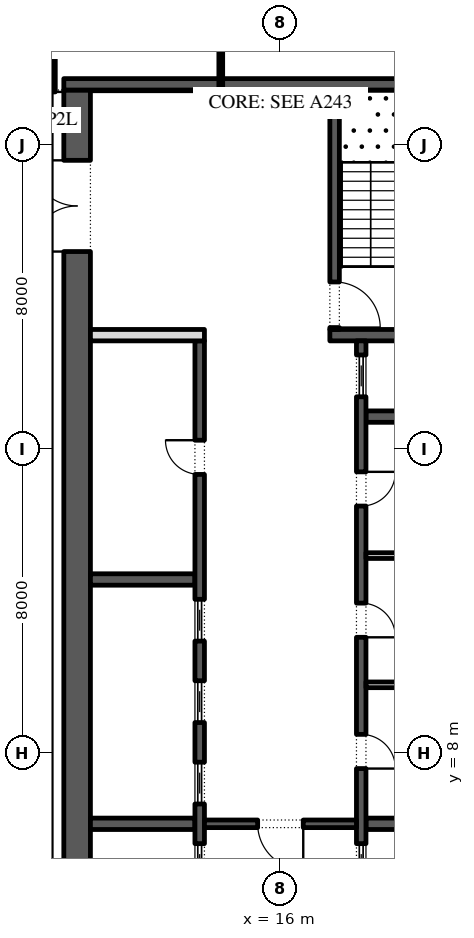
"""IFC4 building model, lengths in metres.
Left out: names, types, materials, properties, quantities, classifications, styles, units other than length and angle.
Written with IfcOpenShell. Run it as: python <this file> out.ifc"""

import sys

from ifc_helpers import new_model, si_unit, direction, frame, frame_2d, origin, place, context, subcontext, project, spatial, rectangle, extrude, element, fill, save


model = new_model("IFC4")
c1 = context("Model", 3, precision=1e-05, world=origin(), true_north=direction((0.0, 1.0)))
c2 = subcontext(c1, "Body", "Model", "MODEL_VIEW")
j1 = project(units=[si_unit("LENGTHUNIT", "METRE"), si_unit("PLANEANGLEUNIT", "RADIAN")], contexts=[c1])
p1 = place(None, origin())
s1 = spatial("IfcSite", under=j1, at=p1, CompositionType="ELEMENT")
p2 = place(p1, origin())
s2 = spatial("IfcBuilding", under=s1, at=p2, CompositionType="ELEMENT")
p3 = place(p2, frame((0.0, 0.0, 184.2)))
s3 = spatial("IfcBuildingStorey", under=s2, at=p3, CompositionType="ELEMENT", Elevation=184.2)
p4 = place(p3, frame((10.65, -2.45, 0.0), z_axis=(0.0, 0.0, 1.0), x_axis=(0.0, 1.0, 0.0)))
e1 = element("IfcWall", 1, at=p4, inside=s3, PredefinedType="SHEAR", context=c2, shape_type="SweptSolid", body=[
    extrude(rectangle(XDim=27.9, YDim=0.7, at=frame_2d((13.95, 0.0))), origin(), (0.0, 0.0, 1.0), 4.0),
])
p5 = place(p4, frame((23.65, 0.0, 0.0)))
e2 = element("IfcOpeningElement", 2, at=p5, cuts=e1, PredefinedType="OPENING", context=c2, shape_type="SweptSolid", body=[
    extrude(rectangle(XDim=2.4, YDim=2.1, at=frame_2d((1.2, 1.05))), frame((0.0, 0.36, 0.0), z_axis=(0.0, -1.0, 0.0), x_axis=(1.0, 0.0, 0.0)), (0.0, 0.0, 1.0), 0.72),
])
p6 = place(p4, frame((1.387, 0.0, 0.0)))
e3 = element("IfcOpeningElement", 3, at=p6, cuts=e1, PredefinedType="OPENING", context=c2, shape_type="SweptSolid", body=[
    extrude(rectangle(XDim=0.9, YDim=2.1, at=frame_2d((0.45, 1.05))), frame((0.0, 0.36, 0.0), z_axis=(0.0, -1.0, 0.0), x_axis=(1.0, 0.0, 0.0)), (0.0, 0.0, 1.0), 0.72),
])
p7 = place(p4, frame((4.562, 0.0, 0.0)))
e4 = element("IfcOpeningElement", 4, at=p7, cuts=e1, PredefinedType="OPENING", context=c2, shape_type="SweptSolid", body=[
    extrude(rectangle(XDim=1.0, YDim=2.1, at=frame_2d((0.5, 1.05))), frame((0.0, 0.36, 0.0), z_axis=(0.0, -1.0, 0.0), x_axis=(1.0, 0.0, 0.0)), (0.0, 0.0, 1.0), 0.72),
])
p8 = place(p3, frame((10.3, 25.6, 0.0), z_axis=(0.0, 0.0, 1.0), x_axis=(1.0, 0.0, 0.0)))
e5 = element("IfcWall", 5, at=p8, inside=s3, PredefinedType="SHEAR", context=c2, shape_type="SweptSolid", body=[
    extrude(rectangle(XDim=11.4, YDim=0.3, at=frame_2d((5.7, 0.0))), origin(), (0.0, 0.0, 1.0), 4.0),
])
p9 = place(p3, frame((17.3, 19.0, 0.0), z_axis=(0.0, 0.0, 1.0), x_axis=(1.0, 0.0, 0.0)))
e6 = element("IfcWall", 6, at=p9, inside=s3, PredefinedType="SHEAR", context=c2, shape_type="SweptSolid", body=[
    extrude(rectangle(XDim=3.7, YDim=0.3, at=frame_2d((1.85, 0.0))), origin(), (0.0, 0.0, 1.0), 4.0),
])
p10 = place(p3, frame((17.425, 19.15, 0.0), z_axis=(0.0, 0.0, 1.0), x_axis=(0.0, 1.0, 0.0)))
e7 = element("IfcWall", 7, at=p10, inside=s3, PredefinedType="SHEAR", context=c2, shape_type="SweptSolid", body=[
    extrude(rectangle(XDim=6.3, YDim=0.25, at=frame_2d((3.15, 0.0))), origin(), (0.0, 0.0, 1.0), 4.0),
])
p11 = place(p10, frame((0.05, 0.0, 0.0)))
e8 = element("IfcOpeningElement", 8, at=p11, cuts=e7, PredefinedType="OPENING", context=c2, shape_type="SweptSolid", body=[
    extrude(rectangle(XDim=1.2, YDim=2.1, at=frame_2d((0.6, 1.05))), frame((0.0, 0.135, 0.0), z_axis=(0.0, -1.0, 0.0), x_axis=(1.0, 0.0, 0.0)), (0.0, 0.0, 1.0), 0.27),
])
for number, where, z_axis, x_axis in (
    (9, (18.25, 6.143, 0.0), (0.0, 0.0, 1.0), (1.0, 0.0, 0.0)),
    (10, (18.25, 16.857, 0.0), (0.0, 0.0, 1.0), (1.0, 0.0, 0.0)),
):
    element("IfcWall", number, at=place(p3, frame(where, z_axis=z_axis, x_axis=x_axis)), inside=s3, PredefinedType="SHEAR", context=c2, shape_type="SweptSolid", body=[
        extrude(rectangle(XDim=2.75, YDim=0.3, at=frame_2d((1.375, 0.0))), origin(), (0.0, 0.0, 1.0), 4.0),
    ])
p12 = place(p3, frame((18.125, 4.15, 0.0), z_axis=(0.0, 0.0, 1.0), x_axis=(0.0, 1.0, 0.0)))
e11 = element("IfcWall", 11, at=p12, inside=s3, PredefinedType="SHEAR", context=c2, shape_type="SweptSolid", body=[
    extrude(rectangle(XDim=14.7, YDim=0.25, at=frame_2d((7.35, 0.0))), origin(), (0.0, 0.0, 1.0), 4.0),
])
p13 = place(p12, frame((3.446, 0.0, 0.0)))
e12 = element("IfcOpeningElement", 12, at=p13, cuts=e11, PredefinedType="OPENING", context=c2, shape_type="SweptSolid", body=[
    extrude(rectangle(XDim=0.9, YDim=2.1, at=frame_2d((0.45, 1.05))), frame((0.0, 0.135, 0.0), z_axis=(0.0, -1.0, 0.0), x_axis=(1.0, 0.0, 0.0)), (0.0, 0.0, 1.0), 0.27),
])
p14 = place(p12, frame((6.9, 0.0, 0.0)))
e13 = element("IfcOpeningElement", 13, at=p14, cuts=e11, PredefinedType="OPENING", context=c2, shape_type="SweptSolid", body=[
    extrude(rectangle(XDim=0.9, YDim=2.1, at=frame_2d((0.45, 1.05))), frame((0.0, 0.135, 0.0), z_axis=(0.0, -1.0, 0.0), x_axis=(1.0, 0.0, 0.0)), (0.0, 0.0, 1.0), 0.27),
])
p15 = place(p12, frame((10.354, 0.0, 0.0)))
e14 = element("IfcOpeningElement", 14, at=p15, cuts=e11, PredefinedType="OPENING", context=c2, shape_type="SweptSolid", body=[
    extrude(rectangle(XDim=0.9, YDim=2.1, at=frame_2d((0.45, 1.05))), frame((0.0, 0.135, 0.0), z_axis=(0.0, -1.0, 0.0), x_axis=(1.0, 0.0, 0.0)), (0.0, 0.0, 1.0), 0.27),
])
p16 = place(p12, frame((0.371, 0.0, 0.0)))
e15 = element("IfcOpeningElement", 15, at=p16, cuts=e11, PredefinedType="OPENING", context=c2, shape_type="SweptSolid", body=[
    extrude(rectangle(XDim=1.1, YDim=2.1, at=frame_2d((0.55, 1.05))), frame((0.0, 0.135, 0.0), z_axis=(0.0, -1.0, 0.0), x_axis=(1.0, 0.0, 0.0)), (0.0, 0.0, 1.0), 0.27),
])
p17 = place(p12, frame((13.229, 0.0, 0.0)))
e16 = element("IfcOpeningElement", 16, at=p17, cuts=e11, PredefinedType="OPENING", context=c2, shape_type="SweptSolid", body=[
    extrude(rectangle(XDim=1.1, YDim=2.1, at=frame_2d((0.55, 1.05))), frame((0.0, 0.135, 0.0), z_axis=(0.0, -1.0, 0.0), x_axis=(1.0, 0.0, 0.0)), (0.0, 0.0, 1.0), 0.27),
])
for number, where, z_axis, x_axis in (
    (17, (18.25, 9.8, 0.0), (0.0, 0.0, 1.0), (1.0, 0.0, 0.0)),
    (18, (18.25, 13.2, 0.0), (0.0, 0.0, 1.0), (1.0, 0.0, 0.0)),
):
    element("IfcWall", number, at=place(p3, frame(where, z_axis=z_axis, x_axis=x_axis)), inside=s3, PredefinedType="PARTITIONING", context=c2, shape_type="SweptSolid", body=[
        extrude(rectangle(XDim=2.75, YDim=0.15, at=frame_2d((1.375, 0.0))), origin(), (0.0, 0.0, 1.0), 4.0),
    ])
for number, where, z_axis, x_axis in (
    (19, (11.0, 6.143, 0.0), (0.0, 0.0, 1.0), (1.0, 0.0, 0.0)),
    (20, (11.0, 12.571, 0.0), (0.0, 0.0, 1.0), (1.0, 0.0, 0.0)),
):
    element("IfcWall", number, at=place(p3, frame(where, z_axis=z_axis, x_axis=x_axis)), inside=s3, PredefinedType="SHEAR", context=c2, shape_type="SweptSolid", body=[
        extrude(rectangle(XDim=2.75, YDim=0.3, at=frame_2d((1.375, 0.0))), origin(), (0.0, 0.0, 1.0), 4.0),
    ])
p18 = place(p3, frame((13.875, -2.45, 0.0), z_axis=(0.0, 0.0, 1.0), x_axis=(0.0, 1.0, 0.0)))
e21 = element("IfcWall", 21, at=p18, inside=s3, PredefinedType="SHEAR", context=c2, shape_type="SweptSolid", body=[
    extrude(rectangle(XDim=21.3, YDim=0.25, at=frame_2d((10.65, 0.0))), origin(), (0.0, 0.0, 1.0), 4.0),
])
p19 = place(p18, frame((17.786, 0.0, 0.0)))
e22 = element("IfcOpeningElement", 22, at=p19, cuts=e21, PredefinedType="OPENING", context=c2, shape_type="SweptSolid", body=[
    extrude(rectangle(XDim=0.9, YDim=2.1, at=frame_2d((0.45, 1.05))), frame((0.0, 0.135, 0.0), z_axis=(0.0, -1.0, 0.0), x_axis=(1.0, 0.0, 0.0)), (0.0, 0.0, 1.0), 0.27),
])
p20 = place(p18, frame((6.971, 0.0, 0.0)))
e23 = element("IfcOpeningElement", 23, at=p20, cuts=e21, PredefinedType="OPENING", context=c2, shape_type="SweptSolid", body=[
    extrude(rectangle(XDim=1.1, YDim=2.1, at=frame_2d((0.55, 1.05))), frame((0.0, 0.135, 0.0), z_axis=(0.0, -1.0, 0.0), x_axis=(1.0, 0.0, 0.0)), (0.0, 0.0, 1.0), 0.27),
])
p21 = place(p18, frame((9.114, 0.0, 0.0)))
e24 = element("IfcOpeningElement", 24, at=p21, cuts=e21, PredefinedType="OPENING", context=c2, shape_type="SweptSolid", body=[
    extrude(rectangle(XDim=1.1, YDim=2.1, at=frame_2d((0.55, 1.05))), frame((0.0, 0.135, 0.0), z_axis=(0.0, -1.0, 0.0), x_axis=(1.0, 0.0, 0.0)), (0.0, 0.0, 1.0), 0.27),
])
p22 = place(p18, frame((11.257, 0.0, 0.0)))
e25 = element("IfcOpeningElement", 25, at=p22, cuts=e21, PredefinedType="OPENING", context=c2, shape_type="SweptSolid", body=[
    extrude(rectangle(XDim=1.1, YDim=2.1, at=frame_2d((0.55, 1.05))), frame((0.0, 0.135, 0.0), z_axis=(0.0, -1.0, 0.0), x_axis=(1.0, 0.0, 0.0)), (0.0, 0.0, 1.0), 0.27),
])
p23 = place(p18, frame((13.4, 0.0, 0.0)))
e26 = element("IfcOpeningElement", 26, at=p23, cuts=e21, PredefinedType="OPENING", context=c2, shape_type="SweptSolid", body=[
    extrude(rectangle(XDim=1.1, YDim=2.1, at=frame_2d((0.55, 1.05))), frame((0.0, 0.135, 0.0), z_axis=(0.0, -1.0, 0.0), x_axis=(1.0, 0.0, 0.0)), (0.0, 0.0, 1.0), 0.27),
])
p24 = place(p3, frame((11.0, 19.0, 0.0), z_axis=(0.0, 0.0, 1.0), x_axis=(1.0, 0.0, 0.0)))
e27 = element("IfcWall", 27, at=p24, inside=s3, PredefinedType="PARTITIONING", context=c2, shape_type="SweptSolid", body=[
    extrude(rectangle(XDim=3.0, YDim=0.3, at=frame_2d((1.5, 0.0))), origin(), (0.0, 0.0, 1.0), 4.0),
])
p25 = place(p3, frame((14.0, 6.143, 0.0), z_axis=(0.0, 0.0, 1.0), x_axis=(1.0, 0.0, 0.0)))
e28 = element("IfcWall", 28, at=p25, inside=s3, PredefinedType="SHEAR", context=c2, shape_type="SweptSolid", body=[
    extrude(rectangle(XDim=4.0, YDim=0.2, at=frame_2d((2.0, 0.0))), origin(), (0.0, 0.0, 1.0), 4.0),
])
p26 = place(p25, frame((1.4, 0.0, 0.0)))
e29 = element("IfcOpeningElement", 29, at=p26, cuts=e28, PredefinedType="OPENING", context=c2, shape_type="SweptSolid", body=[
    extrude(rectangle(XDim=1.2, YDim=2.1, at=frame_2d((0.6, 1.05))), frame((0.0, 0.11, 0.0), z_axis=(0.0, -1.0, 0.0), x_axis=(1.0, 0.0, 0.0)), (0.0, 0.0, 1.0), 0.22),
])
p27 = place(p3, frame((10.0, 27.125, 0.0), z_axis=(0.0, 0.0, 1.0), x_axis=(0.0, -1.0, 0.0)))
e30 = element("IfcWall", 30, at=p27, inside=s3, PredefinedType="PARTITIONING", context=c2, shape_type="SweptSolid", body=[
    extrude(rectangle(XDim=1.725, YDim=0.15, at=frame_2d((0.863, 0.0))), origin(), (0.0, 0.0, 1.0), 3.02),
])
p28 = place(p3, frame((14.43, 31.45, 0.0), z_axis=(0.0, 0.0, 1.0), x_axis=(0.0, -1.0, 0.0)))
e31 = element("IfcWall", 31, at=p28, inside=s3, PredefinedType="PARTITIONING", context=c2, shape_type="SweptSolid", body=[
    extrude(rectangle(XDim=6.05, YDim=0.1, at=frame_2d((3.025, 0.0))), origin(), (0.0, 0.0, 1.0), 4.0),
])
p29 = place(p13, frame((0.9, -0.2, 0.0), z_axis=(0.0, 0.0, 1.0), x_axis=(-1.0, 0.0, 0.0)))
e32 = element("IfcDoor", 32, at=p29, inside=s3, OperationType="SINGLE_SWING_LEFT", PredefinedType="DOOR", context=c2, shape_type="SweptSolid", body=[
    extrude(rectangle(XDim=0.9, YDim=2.1, at=frame_2d((0.45, 1.05))), frame((0.0, -0.075, 0.0), z_axis=(0.0, -1.0, 0.0), x_axis=(1.0, 0.0, 0.0)), (0.0, 0.0, 1.0), 0.05),
])
fill(e12, e32)
p30 = place(p14, frame((0.9, -0.2, 0.0), z_axis=(0.0, 0.0, 1.0), x_axis=(-1.0, 0.0, 0.0)))
e33 = element("IfcDoor", 33, at=p30, inside=s3, OperationType="SINGLE_SWING_LEFT", PredefinedType="DOOR", context=c2, shape_type="SweptSolid", body=[
    extrude(rectangle(XDim=0.9, YDim=2.1, at=frame_2d((0.45, 1.05))), frame((0.0, -0.075, 0.0), z_axis=(0.0, -1.0, 0.0), x_axis=(1.0, 0.0, 0.0)), (0.0, 0.0, 1.0), 0.05),
])
fill(e13, e33)
p31 = place(p15, frame((0.9, -0.2, 0.0), z_axis=(0.0, 0.0, 1.0), x_axis=(-1.0, 0.0, 0.0)))
e34 = element("IfcDoor", 34, at=p31, inside=s3, OperationType="SINGLE_SWING_RIGHT", PredefinedType="DOOR", context=c2, shape_type="SweptSolid", body=[
    extrude(rectangle(XDim=0.9, YDim=2.1, at=frame_2d((0.45, 1.05))), frame((0.0, -0.075, 0.0), z_axis=(0.0, -1.0, 0.0), x_axis=(1.0, 0.0, 0.0)), (0.0, 0.0, 1.0), 0.05),
])
fill(e14, e34)
p32 = place(p16, origin())
e35 = element("IfcDoor", 35, at=p32, inside=s3, OperationType="SLIDING_TO_LEFT", PredefinedType="DOOR", context=c2, shape_type="SweptSolid", body=[
    extrude(rectangle(XDim=1.1, YDim=2.1, at=frame_2d((0.55, 1.05))), frame((0.0, 0.025, 0.0), z_axis=(0.0, -1.0, 0.0), x_axis=(1.0, 0.0, 0.0)), (0.0, 0.0, 1.0), 0.05),
])
fill(e15, e35)
p33 = place(p17, origin())
e36 = element("IfcDoor", 36, at=p33, inside=s3, OperationType="SLIDING_TO_LEFT", PredefinedType="DOOR", context=c2, shape_type="SweptSolid", body=[
    extrude(rectangle(XDim=1.1, YDim=2.1, at=frame_2d((0.55, 1.05))), frame((0.0, 0.025, 0.0), z_axis=(0.0, -1.0, 0.0), x_axis=(1.0, 0.0, 0.0)), (0.0, 0.0, 1.0), 0.05),
])
fill(e16, e36)
p34 = place(p19, origin())
e37 = element("IfcDoor", 37, at=p34, inside=s3, OperationType="SINGLE_SWING_LEFT", PredefinedType="DOOR", context=c2, shape_type="SweptSolid", body=[
    extrude(rectangle(XDim=0.9, YDim=2.1, at=frame_2d((0.45, 1.05))), frame((0.0, 0.125, 0.0), z_axis=(0.0, -1.0, 0.0), x_axis=(1.0, 0.0, 0.0)), (0.0, 0.0, 1.0), 0.05),
])
fill(e22, e37)
p35 = place(p20, origin())
e38 = element("IfcDoor", 38, at=p35, inside=s3, OperationType="SLIDING_TO_LEFT", PredefinedType="DOOR", context=c2, shape_type="SweptSolid", body=[
    extrude(rectangle(XDim=1.1, YDim=2.1, at=frame_2d((0.55, 1.05))), frame((0.0, 0.025, 0.0), z_axis=(0.0, -1.0, 0.0), x_axis=(1.0, 0.0, 0.0)), (0.0, 0.0, 1.0), 0.05),
])
fill(e23, e38)
p36 = place(p21, origin())
e39 = element("IfcDoor", 39, at=p36, inside=s3, OperationType="SLIDING_TO_LEFT", PredefinedType="DOOR", context=c2, shape_type="SweptSolid", body=[
    extrude(rectangle(XDim=1.1, YDim=2.1, at=frame_2d((0.55, 1.05))), frame((0.0, 0.025, 0.0), z_axis=(0.0, -1.0, 0.0), x_axis=(1.0, 0.0, 0.0)), (0.0, 0.0, 1.0), 0.05),
])
fill(e24, e39)
p37 = place(p22, origin())
e40 = element("IfcDoor", 40, at=p37, inside=s3, OperationType="SLIDING_TO_LEFT", PredefinedType="DOOR", context=c2, shape_type="SweptSolid", body=[
    extrude(rectangle(XDim=1.1, YDim=2.1, at=frame_2d((0.55, 1.05))), frame((0.0, 0.025, 0.0), z_axis=(0.0, -1.0, 0.0), x_axis=(1.0, 0.0, 0.0)), (0.0, 0.0, 1.0), 0.05),
])
fill(e25, e40)
p38 = place(p23, origin())
e41 = element("IfcDoor", 41, at=p38, inside=s3, OperationType="SLIDING_TO_LEFT", PredefinedType="DOOR", context=c2, shape_type="SweptSolid", body=[
    extrude(rectangle(XDim=1.1, YDim=2.1, at=frame_2d((0.55, 1.05))), frame((0.0, 0.025, 0.0), z_axis=(0.0, -1.0, 0.0), x_axis=(1.0, 0.0, 0.0)), (0.0, 0.0, 1.0), 0.05),
])
fill(e26, e41)
p39 = place(p26, frame((1.2, 0.0, 0.0), z_axis=(0.0, 0.0, 1.0), x_axis=(-1.0, 0.0, 0.0)))
e42 = element("IfcDoor", 42, at=p39, inside=s3, OperationType="SINGLE_SWING_RIGHT", PredefinedType="DOOR", context=c2, shape_type="SweptSolid", body=[
    extrude(rectangle(XDim=1.2, YDim=2.1, at=frame_2d((0.6, 1.05))), frame((0.0, 0.025, 0.0), z_axis=(0.0, -1.0, 0.0), x_axis=(1.0, 0.0, 0.0)), (0.0, 0.0, 1.0), 0.05),
])
fill(e29, e42)
p40 = place(p5, origin())
e43 = element("IfcDoor", 43, at=p40, inside=s3, OperationType="DOUBLE_DOOR_SINGLE_SWING", PredefinedType="DOOR", context=c2, shape_type="SweptSolid", body=[
    extrude(rectangle(XDim=2.4, YDim=2.1, at=frame_2d((1.2, 1.05))), frame((0.0, 0.025, 0.0), z_axis=(0.0, -1.0, 0.0), x_axis=(1.0, 0.0, 0.0)), (0.0, 0.0, 1.0), 0.05),
])
fill(e2, e43)
p41 = place(p11, frame((1.2, 0.0, 0.0), z_axis=(0.0, 0.0, 1.0), x_axis=(-1.0, 0.0, 0.0)))
e44 = element("IfcDoor", 44, at=p41, inside=s3, OperationType="SINGLE_SWING_LEFT", PredefinedType="DOOR", context=c2, shape_type="SweptSolid", body=[
    extrude(rectangle(XDim=1.2, YDim=2.1, at=frame_2d((0.6, 1.05))), frame((0.0, 0.025, 0.0), z_axis=(0.0, -1.0, 0.0), x_axis=(1.0, 0.0, 0.0)), (0.0, 0.0, 1.0), 0.05),
])
fill(e8, e44)
save(model, sys.argv[1])
